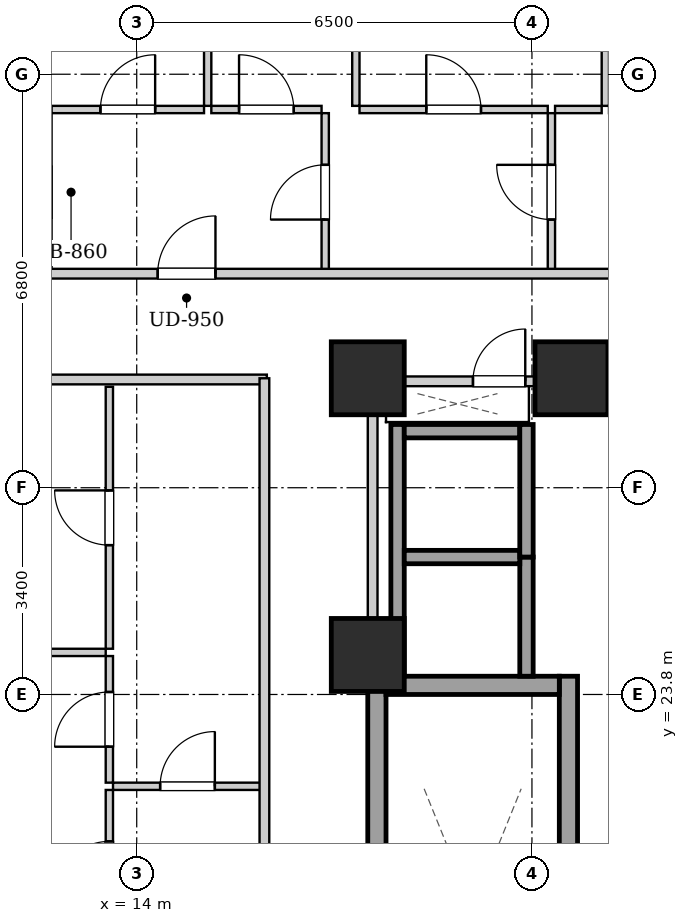
"""IFC4 building model, lengths in metres.
Left out: names, types, materials, properties, quantities, classifications, styles, units other than length and angle.
Written with IfcOpenShell. Run it as: python <this file> out.ifc"""

import sys

from ifc_helpers import new_model, si_unit, direction, frame, frame_2d, origin, origin_2d, place, context, subcontext, project, spatial, rectangle, extrude, element, fill, save


model = new_model("IFC4")
c1 = context("Model", 3, precision=1e-05, world=origin(), true_north=direction((0.0, 1.0)))
c2 = subcontext(c1, "Body", "Model", "MODEL_VIEW")
j1 = project(units=[si_unit("LENGTHUNIT", "METRE"), si_unit("PLANEANGLEUNIT", "RADIAN")], contexts=[c1])
p1 = place(None, origin())
s1 = spatial("IfcSite", under=j1, at=p1, CompositionType="ELEMENT")
p2 = place(p1, origin())
s2 = spatial("IfcBuilding", under=s1, at=p2, CompositionType="ELEMENT")
p3 = place(p2, frame((0.0, 0.0, 29.0)))
s3 = spatial("IfcBuildingStorey", under=s2, at=p3, CompositionType="ELEMENT", Elevation=29.0)
for number, where, z_axis, x_axis in (
    (1, (17.8, 29.0, 0.0), (0.0, 0.0, 1.0), (1.0, 0.0, 0.0)),
    (2, (21.15, 29.0, 0.0), (0.0, 0.0, 1.0), (1.0, 0.0, 0.0)),
    (3, (17.8, 24.45, 0.0), (0.0, 0.0, 1.0), (1.0, 0.0, 0.0)),
):
    element("IfcColumn", number, at=place(p3, frame(where, z_axis=z_axis, x_axis=x_axis)), inside=s3, PredefinedType="COLUMN", context=c2, shape_type="SweptSolid", body=[
        extrude(rectangle(XDim=1.2, YDim=1.2, at=origin_2d()), origin(), (0.0, 0.0, 1.0), 3.2),
    ])
for number, where, z_axis, x_axis in (
    (4, (17.95, 15.1, 0.0), (0.0, 0.0, 1.0), (0.0, 1.0, 0.0)),
    (5, (21.1, 15.1, 0.0), (0.0, 0.0, 1.0), (0.0, 1.0, 0.0)),
):
    element("IfcWall", number, at=place(p3, frame(where, z_axis=z_axis, x_axis=x_axis)), inside=s3, PredefinedType="SHEAR", context=c2, shape_type="SweptSolid", body=[
        extrude(rectangle(XDim=9.0, YDim=0.3, at=frame_2d((4.5, 0.0))), origin(), (0.0, 0.0, 1.0), 2.94),
    ])
p4 = place(p3, frame((18.1, 23.95, 0.0), z_axis=(0.0, 0.0, 1.0), x_axis=(1.0, 0.0, 0.0)))
e6 = element("IfcWall", 6, at=p4, inside=s3, PredefinedType="SHEAR", context=c2, shape_type="SweptSolid", body=[
    extrude(rectangle(XDim=2.85, YDim=0.3, at=frame_2d((1.425, 0.0))), origin(), (0.0, 0.0, 1.0), 2.94),
])
p5 = place(p3, frame((18.29, 24.1, 0.0), z_axis=(0.0, 0.0, 1.0), x_axis=(0.0, 1.0, 0.0)))
e7 = element("IfcWall", 7, at=p5, inside=s3, PredefinedType="SHEAR", context=c2, shape_type="SweptSolid", body=[
    extrude(rectangle(XDim=4.14, YDim=0.22, at=frame_2d((2.07, 0.0))), origin(), (0.0, 0.0, 1.0), 2.94),
])
p6 = place(p3, frame((20.41, 24.1, 0.0), z_axis=(0.0, 0.0, 1.0), x_axis=(0.0, 1.0, 0.0)))
e8 = element("IfcWall", 8, at=p6, inside=s3, PredefinedType="SHEAR", context=c2, shape_type="SweptSolid", body=[
    extrude(rectangle(XDim=1.96, YDim=0.22, at=frame_2d((0.98, 0.0))), origin(), (0.0, 0.0, 1.0), 2.94),
])
for number, where, z_axis, x_axis in (
    (9, (18.4, 26.06, 0.0), (0.0, 0.0, 1.0), (1.0, 0.0, 0.0)),
    (10, (18.4, 28.13, 0.0), (0.0, 0.0, 1.0), (1.0, 0.0, 0.0)),
):
    element("IfcWall", number, at=place(p3, frame(where, z_axis=z_axis, x_axis=x_axis)), inside=s3, PredefinedType="SHEAR", context=c2, shape_type="SweptSolid", body=[
        extrude(rectangle(XDim=1.9, YDim=0.22, at=frame_2d((0.95, 0.0))), origin(), (0.0, 0.0, 1.0), 2.94),
    ])
p7 = place(p3, frame((20.41, 26.06, 0.0), z_axis=(0.0, 0.0, 1.0), x_axis=(0.0, 1.0, 0.0)))
e11 = element("IfcWall", 11, at=p7, inside=s3, PredefinedType="SHEAR", context=c2, shape_type="SweptSolid", body=[
    extrude(rectangle(XDim=2.18, YDim=0.22, at=frame_2d((1.09, 0.0))), origin(), (0.0, 0.0, 1.0), 2.94),
])
p8 = place(p3, frame((17.88, 24.12, 0.0), z_axis=(0.0, 0.0, 1.0), x_axis=(0.0, 1.0, 0.0)))
e12 = element("IfcWall", 12, at=p8, inside=s3, PredefinedType="PARTITIONING", context=c2, shape_type="SweptSolid", body=[
    extrude(rectangle(XDim=4.76, YDim=0.16, at=frame_2d((2.38, 0.0))), origin(), (0.0, 0.0, 1.0), 2.275),
])
p9 = place(p3, frame((17.96, 28.95, 0.0), z_axis=(0.0, 0.0, 1.0), x_axis=(1.0, 0.0, 0.0)))
e13 = element("IfcWall", 13, at=p9, inside=s3, PredefinedType="PARTITIONING", context=c2, shape_type="SweptSolid", body=[
    extrude(rectangle(XDim=4.29, YDim=0.16, at=frame_2d((2.145, 0.0))), origin(), (0.0, 0.0, 1.0), 2.155),
])
p10 = place(p9, frame((1.57, 0.0, 0.0)))
e14 = element("IfcOpeningElement", 14, at=p10, cuts=e13, PredefinedType="OPENING", context=c2, shape_type="SweptSolid", body=[
    extrude(rectangle(XDim=0.86, YDim=2.05, at=frame_2d((0.43, 1.025))), frame((0.0, 0.09, 0.0), z_axis=(0.0, -1.0, 0.0), x_axis=(1.0, 0.0, 0.0)), (0.0, 0.0, 1.0), 0.18),
])
p11 = place(p3, frame((7.78, 28.98, 0.0), z_axis=(0.0, 0.0, 1.0), x_axis=(1.0, 0.0, 0.0)))
e15 = element("IfcWall", 15, at=p11, inside=s3, PredefinedType="PARTITIONING", context=c2, shape_type="SweptSolid", body=[
    extrude(rectangle(XDim=8.36, YDim=0.16, at=frame_2d((4.18, 0.0))), origin(), (0.0, 0.0, 1.0), 2.155),
])
p12 = place(p3, frame((17.1, 30.76, 0.0), z_axis=(0.0, 0.0, 1.0), x_axis=(0.0, 1.0, 0.0)))
e16 = element("IfcWall", 16, at=p12, inside=s3, PredefinedType="PARTITIONING", context=c2, shape_type="SweptSolid", body=[
    extrude(rectangle(XDim=2.6, YDim=0.12, at=frame_2d((1.3, 0.0))), origin(), (0.0, 0.0, 1.0), 2.94),
])
p13 = place(p12, frame((0.85, 0.0, 0.0)))
e17 = element("IfcOpeningElement", 17, at=p13, cuts=e16, PredefinedType="OPENING", context=c2, shape_type="SweptSolid", body=[
    extrude(rectangle(XDim=0.9, YDim=2.05, at=frame_2d((0.45, 1.025))), frame((0.0, 0.07, 0.0), z_axis=(0.0, -1.0, 0.0), x_axis=(1.0, 0.0, 0.0)), (0.0, 0.0, 1.0), 0.14),
])
p14 = place(p3, frame((12.6, 33.42, 0.0), z_axis=(0.0, 0.0, 1.0), x_axis=(1.0, 0.0, 0.0)))
e18 = element("IfcWall", 18, at=p14, inside=s3, PredefinedType="PARTITIONING", context=c2, shape_type="SweptSolid", body=[
    extrude(rectangle(XDim=2.507, YDim=0.12, at=frame_2d((1.253, 0.0))), origin(), (0.0, 0.0, 1.0), 2.94),
])
p15 = place(p14, frame((0.803, 0.0, 0.0)))
e19 = element("IfcOpeningElement", 19, at=p15, cuts=e18, PredefinedType="OPENING", context=c2, shape_type="SweptSolid", body=[
    extrude(rectangle(XDim=0.9, YDim=2.05, at=frame_2d((0.45, 1.025))), frame((0.0, 0.07, 0.0), z_axis=(0.0, -1.0, 0.0), x_axis=(1.0, 0.0, 0.0)), (0.0, 0.0, 1.0), 0.14),
])
p16 = place(p3, frame((15.227, 33.42, 0.0), z_axis=(0.0, 0.0, 1.0), x_axis=(1.0, 0.0, 0.0)))
e20 = element("IfcWall", 20, at=p16, inside=s3, PredefinedType="PARTITIONING", context=c2, shape_type="SweptSolid", body=[
    extrude(rectangle(XDim=1.813, YDim=0.12, at=frame_2d((0.906, 0.0))), origin(), (0.0, 0.0, 1.0), 2.94),
])
p17 = place(p16, frame((0.456, 0.0, 0.0)))
e21 = element("IfcOpeningElement", 21, at=p17, cuts=e20, PredefinedType="OPENING", context=c2, shape_type="SweptSolid", body=[
    extrude(rectangle(XDim=0.9, YDim=2.05, at=frame_2d((0.45, 1.025))), frame((0.0, 0.07, 0.0), z_axis=(0.0, -1.0, 0.0), x_axis=(1.0, 0.0, 0.0)), (0.0, 0.0, 1.0), 0.14),
])
p18 = place(p3, frame((20.82, 30.76, 0.0), z_axis=(0.0, 0.0, 1.0), x_axis=(0.0, 1.0, 0.0)))
e22 = element("IfcWall", 22, at=p18, inside=s3, PredefinedType="PARTITIONING", context=c2, shape_type="SweptSolid", body=[
    extrude(rectangle(XDim=2.6, YDim=0.12, at=frame_2d((1.3, 0.0))), origin(), (0.0, 0.0, 1.0), 2.94),
])
p19 = place(p18, frame((0.85, 0.0, 0.0)))
e23 = element("IfcOpeningElement", 23, at=p19, cuts=e22, PredefinedType="OPENING", context=c2, shape_type="SweptSolid", body=[
    extrude(rectangle(XDim=0.9, YDim=2.05, at=frame_2d((0.45, 1.025))), frame((0.0, 0.07, 0.0), z_axis=(0.0, -1.0, 0.0), x_axis=(1.0, 0.0, 0.0)), (0.0, 0.0, 1.0), 0.14),
])
p20 = place(p3, frame((17.664, 33.42, 0.0), z_axis=(0.0, 0.0, 1.0), x_axis=(1.0, 0.0, 0.0)))
e24 = element("IfcWall", 24, at=p20, inside=s3, PredefinedType="PARTITIONING", context=c2, shape_type="SweptSolid", body=[
    extrude(rectangle(XDim=3.096, YDim=0.12, at=frame_2d((1.548, 0.0))), origin(), (0.0, 0.0, 1.0), 2.94),
])
p21 = place(p20, frame((1.098, 0.0, 0.0)))
e25 = element("IfcOpeningElement", 25, at=p21, cuts=e24, PredefinedType="OPENING", context=c2, shape_type="SweptSolid", body=[
    extrude(rectangle(XDim=0.9, YDim=2.05, at=frame_2d((0.45, 1.025))), frame((0.0, 0.07, 0.0), z_axis=(0.0, -1.0, 0.0), x_axis=(1.0, 0.0, 0.0)), (0.0, 0.0, 1.0), 0.14),
])
p22 = place(p3, frame((20.88, 33.42, 0.0), z_axis=(0.0, 0.0, 1.0), x_axis=(1.0, 0.0, 0.0)))
e26 = element("IfcWall", 26, at=p22, inside=s3, PredefinedType="PARTITIONING", context=c2, shape_type="SweptSolid", body=[
    extrude(rectangle(XDim=0.767, YDim=0.12, at=frame_2d((0.384, 0.0))), origin(), (0.0, 0.0, 1.0), 2.94),
])
p23 = place(p3, frame((15.167, 33.48, 0.0), z_axis=(0.0, 0.0, 1.0), x_axis=(0.0, 1.0, 0.0)))
e27 = element("IfcWall", 27, at=p23, inside=s3, PredefinedType="PARTITIONING", context=c2, shape_type="SweptSolid", body=[
    extrude(rectangle(XDim=13.84, YDim=0.12, at=frame_2d((6.92, 0.0))), origin(), (0.0, 0.0, 1.0), 2.94),
])
p24 = place(p23, frame((6.455, 0.0, 0.0)))
e28 = element("IfcOpeningElement", 28, at=p24, cuts=e27, PredefinedType="OPENING", context=c2, shape_type="SweptSolid", body=[
    extrude(rectangle(XDim=0.9, YDim=2.05, at=frame_2d((0.45, 1.025))), frame((0.0, 0.07, 0.0), z_axis=(0.0, -1.0, 0.0), x_axis=(1.0, 0.0, 0.0)), (0.0, 0.0, 1.0), 0.14),
])
p25 = place(p3, frame((17.604, 33.48, 0.0), z_axis=(0.0, 0.0, 1.0), x_axis=(0.0, 1.0, 0.0)))
e29 = element("IfcWall", 29, at=p25, inside=s3, PredefinedType="PARTITIONING", context=c2, shape_type="SweptSolid", body=[
    extrude(rectangle(XDim=13.84, YDim=0.12, at=frame_2d((6.92, 0.0))), origin(), (0.0, 0.0, 1.0), 2.94),
])
p26 = place(p25, frame((6.455, 0.0, 0.0)))
e30 = element("IfcOpeningElement", 30, at=p26, cuts=e29, PredefinedType="OPENING", context=c2, shape_type="SweptSolid", body=[
    extrude(rectangle(XDim=0.9, YDim=2.05, at=frame_2d((0.45, 1.025))), frame((0.0, 0.07, 0.0), z_axis=(0.0, -1.0, 0.0), x_axis=(1.0, 0.0, 0.0)), (0.0, 0.0, 1.0), 0.14),
])
p27 = place(p3, frame((21.707, 33.48, 0.0), z_axis=(0.0, 0.0, 1.0), x_axis=(0.0, 1.0, 0.0)))
e31 = element("IfcWall", 31, at=p27, inside=s3, PredefinedType="PARTITIONING", context=c2, shape_type="SweptSolid", body=[
    extrude(rectangle(XDim=13.84, YDim=0.12, at=frame_2d((6.92, 0.0))), origin(), (0.0, 0.0, 1.0), 2.94),
])
p28 = place(p27, frame((6.455, 0.0, 0.0)))
e32 = element("IfcOpeningElement", 32, at=p28, cuts=e31, PredefinedType="OPENING", context=c2, shape_type="SweptSolid", body=[
    extrude(rectangle(XDim=0.9, YDim=2.05, at=frame_2d((0.45, 1.025))), frame((0.0, 0.07, 0.0), z_axis=(0.0, -1.0, 0.0), x_axis=(1.0, 0.0, 0.0)), (0.0, 0.0, 1.0), 0.14),
])
p29 = place(p3, frame((13.61, 22.29, 0.0), z_axis=(0.0, 0.0, 1.0), x_axis=(1.0, 0.0, 0.0)))
e33 = element("IfcWall", 33, at=p29, inside=s3, PredefinedType="PARTITIONING", context=c2, shape_type="SweptSolid", body=[
    extrude(rectangle(XDim=2.45, YDim=0.12, at=frame_2d((1.225, 0.0))), origin(), (0.0, 0.0, 1.0), 2.94),
])
p30 = place(p29, frame((0.775, 0.0, 0.0)))
e34 = element("IfcOpeningElement", 34, at=p30, cuts=e33, PredefinedType="OPENING", context=c2, shape_type="SweptSolid", body=[
    extrude(rectangle(XDim=0.9, YDim=2.05, at=frame_2d((0.45, 1.025))), frame((0.0, 0.07, 0.0), z_axis=(0.0, -1.0, 0.0), x_axis=(1.0, 0.0, 0.0)), (0.0, 0.0, 1.0), 0.14),
])
p31 = place(p3, frame((13.55, 22.35, 0.0), z_axis=(0.0, 0.0, 1.0), x_axis=(0.0, 1.0, 0.0)))
e35 = element("IfcWall", 35, at=p31, inside=s3, PredefinedType="PARTITIONING", context=c2, shape_type="SweptSolid", body=[
    extrude(rectangle(XDim=2.082, YDim=0.12, at=frame_2d((1.041, 0.0))), origin(), (0.0, 0.0, 1.0), 2.94),
])
p32 = place(p31, frame((0.591, 0.0, 0.0)))
e36 = element("IfcOpeningElement", 36, at=p32, cuts=e35, PredefinedType="OPENING", context=c2, shape_type="SweptSolid", body=[
    extrude(rectangle(XDim=0.9, YDim=2.05, at=frame_2d((0.45, 1.025))), frame((0.0, 0.07, 0.0), z_axis=(0.0, -1.0, 0.0), x_axis=(1.0, 0.0, 0.0)), (0.0, 0.0, 1.0), 0.14),
])
p33 = place(p3, frame((13.55, 24.552, 0.0), z_axis=(0.0, 0.0, 1.0), x_axis=(0.0, 1.0, 0.0)))
e37 = element("IfcWall", 37, at=p33, inside=s3, PredefinedType="PARTITIONING", context=c2, shape_type="SweptSolid", body=[
    extrude(rectangle(XDim=4.308, YDim=0.12, at=frame_2d((2.154, 0.0))), origin(), (0.0, 0.0, 1.0), 2.94),
])
p34 = place(p33, frame((1.704, 0.0, 0.0)))
e38 = element("IfcOpeningElement", 38, at=p34, cuts=e37, PredefinedType="OPENING", context=c2, shape_type="SweptSolid", body=[
    extrude(rectangle(XDim=0.9, YDim=2.05, at=frame_2d((0.45, 1.025))), frame((0.0, 0.07, 0.0), z_axis=(0.0, -1.0, 0.0), x_axis=(1.0, 0.0, 0.0)), (0.0, 0.0, 1.0), 0.14),
])
p35 = place(p3, frame((13.55, 19.638, 0.0), z_axis=(0.0, 0.0, 1.0), x_axis=(0.0, 1.0, 0.0)))
e39 = element("IfcWall", 39, at=p35, inside=s3, PredefinedType="PARTITIONING", context=c2, shape_type="SweptSolid", body=[
    extrude(rectangle(XDim=2.592, YDim=0.12, at=frame_2d((1.296, 0.0))), origin(), (0.0, 0.0, 1.0), 2.94),
])
p36 = place(p35, frame((0.846, 0.0, 0.0)))
e40 = element("IfcOpeningElement", 40, at=p36, cuts=e39, PredefinedType="OPENING", context=c2, shape_type="SweptSolid", body=[
    extrude(rectangle(XDim=0.9, YDim=2.05, at=frame_2d((0.45, 1.025))), frame((0.0, 0.07, 0.0), z_axis=(0.0, -1.0, 0.0), x_axis=(1.0, 0.0, 0.0)), (0.0, 0.0, 1.0), 0.14),
])
p37 = place(p3, frame((9.93, 24.492, 0.0), z_axis=(0.0, 0.0, 1.0), x_axis=(1.0, 0.0, 0.0)))
e41 = element("IfcWall", 41, at=p37, inside=s3, PredefinedType="PARTITIONING", context=c2, shape_type="SweptSolid", body=[
    extrude(rectangle(XDim=3.56, YDim=0.12, at=frame_2d((1.78, 0.0))), origin(), (0.0, 0.0, 1.0), 2.508),
])
p38 = place(p37, frame((1.33, 0.0, 0.0)))
e42 = element("IfcOpeningElement", 42, at=p38, cuts=e41, PredefinedType="OPENING", context=c2, shape_type="SweptSolid", body=[
    extrude(rectangle(XDim=0.9, YDim=2.05, at=frame_2d((0.45, 1.025))), frame((0.0, 0.07, 0.0), z_axis=(0.0, -1.0, 0.0), x_axis=(1.0, 0.0, 0.0)), (0.0, 0.0, 1.0), 0.14),
])
p39 = place(p3, frame((10.05, 30.72, 0.0), z_axis=(0.0, 0.0, 1.0), x_axis=(1.0, 0.0, 0.0)))
e43 = element("IfcWall", 43, at=p39, inside=s3, PredefinedType="PARTITIONING", context=c2, shape_type="SweptSolid", body=[
    extrude(rectangle(XDim=33.9, YDim=0.16, at=frame_2d((16.95, 0.0))), origin(), (0.0, 0.0, 1.0), 2.94),
])
p40 = place(p39, frame((4.295, 0.0, 0.0)))
e44 = element("IfcOpeningElement", 44, at=p40, cuts=e43, PredefinedType="OPENING", context=c2, shape_type="SweptSolid", body=[
    extrude(rectangle(XDim=0.95, YDim=2.1, at=frame_2d((0.475, 1.05))), frame((0.0, 0.09, 0.0), z_axis=(0.0, -1.0, 0.0), x_axis=(1.0, 0.0, 0.0)), (0.0, 0.0, 1.0), 0.18),
])
p41 = place(p39, frame((27.235, 0.0, 0.0)))
e45 = element("IfcOpeningElement", 45, at=p41, cuts=e43, PredefinedType="OPENING", context=c2, shape_type="SweptSolid", body=[
    extrude(rectangle(XDim=0.95, YDim=2.1, at=frame_2d((0.475, 1.05))), frame((0.0, 0.09, 0.0), z_axis=(0.0, -1.0, 0.0), x_axis=(1.0, 0.0, 0.0)), (0.0, 0.0, 1.0), 0.18),
])
p42 = place(p3, frame((16.1, 15.07, 0.0), z_axis=(0.0, 0.0, 1.0), x_axis=(0.0, 1.0, 0.0)))
e46 = element("IfcWall", 46, at=p42, inside=s3, PredefinedType="PARTITIONING", context=c2, shape_type="SweptSolid", body=[
    extrude(rectangle(XDim=13.93, YDim=0.16, at=frame_2d((6.965, 0.0))), origin(), (0.0, 0.0, 1.0), 2.94),
])
p43 = place(p42, frame((4.385, 0.0, 0.0)))
e47 = element("IfcOpeningElement", 47, at=p43, cuts=e46, PredefinedType="OPENING", context=c2, shape_type="SweptSolid", body=[
    extrude(rectangle(XDim=0.95, YDim=2.1, at=frame_2d((0.475, 1.05))), frame((0.0, 0.09, 0.0), z_axis=(0.0, -1.0, 0.0), x_axis=(1.0, 0.0, 0.0)), (0.0, 0.0, 1.0), 0.18),
])
p44 = place(p10, origin())
e48 = element("IfcDoor", 48, at=p44, inside=s3, OperationType="SINGLE_SWING_RIGHT", PredefinedType="DOOR", context=c2, shape_type="SweptSolid", body=[
    extrude(rectangle(XDim=0.86, YDim=2.05, at=frame_2d((0.43, 1.025))), frame((0.0, 0.025, 0.0), z_axis=(0.0, -1.0, 0.0), x_axis=(1.0, 0.0, 0.0)), (0.0, 0.0, 1.0), 0.05),
])
fill(e14, e48)
p45 = place(p13, origin())
e49 = element("IfcDoor", 49, at=p45, inside=s3, OperationType="SINGLE_SWING_LEFT", PredefinedType="DOOR", context=c2, shape_type="SweptSolid", body=[
    extrude(rectangle(XDim=0.9, YDim=2.05, at=frame_2d((0.45, 1.025))), frame((0.0, 0.025, 0.0), z_axis=(0.0, -1.0, 0.0), x_axis=(1.0, 0.0, 0.0)), (0.0, 0.0, 1.0), 0.05),
])
fill(e17, e49)
p46 = place(p15, origin())
e50 = element("IfcDoor", 50, at=p46, inside=s3, OperationType="SINGLE_SWING_RIGHT", PredefinedType="DOOR", context=c2, shape_type="SweptSolid", body=[
    extrude(rectangle(XDim=0.9, YDim=2.05, at=frame_2d((0.45, 1.025))), frame((0.0, 0.025, 0.0), z_axis=(0.0, -1.0, 0.0), x_axis=(1.0, 0.0, 0.0)), (0.0, 0.0, 1.0), 0.05),
])
fill(e19, e50)
p47 = place(p17, origin())
e51 = element("IfcDoor", 51, at=p47, inside=s3, OperationType="SINGLE_SWING_LEFT", PredefinedType="DOOR", context=c2, shape_type="SweptSolid", body=[
    extrude(rectangle(XDim=0.9, YDim=2.05, at=frame_2d((0.45, 1.025))), frame((0.0, 0.025, 0.0), z_axis=(0.0, -1.0, 0.0), x_axis=(1.0, 0.0, 0.0)), (0.0, 0.0, 1.0), 0.05),
])
fill(e21, e51)
p48 = place(p19, origin())
e52 = element("IfcDoor", 52, at=p48, inside=s3, OperationType="SINGLE_SWING_RIGHT", PredefinedType="DOOR", context=c2, shape_type="SweptSolid", body=[
    extrude(rectangle(XDim=0.9, YDim=2.05, at=frame_2d((0.45, 1.025))), frame((0.0, 0.025, 0.0), z_axis=(0.0, -1.0, 0.0), x_axis=(1.0, 0.0, 0.0)), (0.0, 0.0, 1.0), 0.05),
])
fill(e23, e52)
p49 = place(p21, origin())
e53 = element("IfcDoor", 53, at=p49, inside=s3, OperationType="SINGLE_SWING_LEFT", PredefinedType="DOOR", context=c2, shape_type="SweptSolid", body=[
    extrude(rectangle(XDim=0.9, YDim=2.05, at=frame_2d((0.45, 1.025))), frame((0.0, 0.025, 0.0), z_axis=(0.0, -1.0, 0.0), x_axis=(1.0, 0.0, 0.0)), (0.0, 0.0, 1.0), 0.05),
])
fill(e25, e53)
p50 = place(p30, origin())
e54 = element("IfcDoor", 54, at=p50, inside=s3, OperationType="SINGLE_SWING_RIGHT", PredefinedType="DOOR", context=c2, shape_type="SweptSolid", body=[
    extrude(rectangle(XDim=0.9, YDim=2.05, at=frame_2d((0.45, 1.025))), frame((0.0, 0.025, 0.0), z_axis=(0.0, -1.0, 0.0), x_axis=(1.0, 0.0, 0.0)), (0.0, 0.0, 1.0), 0.05),
])
fill(e34, e54)
p51 = place(p32, origin())
e55 = element("IfcDoor", 55, at=p51, inside=s3, OperationType="SINGLE_SWING_LEFT", PredefinedType="DOOR", context=c2, shape_type="SweptSolid", body=[
    extrude(rectangle(XDim=0.9, YDim=2.05, at=frame_2d((0.45, 1.025))), frame((0.0, 0.025, 0.0), z_axis=(0.0, -1.0, 0.0), x_axis=(1.0, 0.0, 0.0)), (0.0, 0.0, 1.0), 0.05),
])
fill(e36, e55)
p52 = place(p34, origin())
e56 = element("IfcDoor", 56, at=p52, inside=s3, OperationType="SINGLE_SWING_RIGHT", PredefinedType="DOOR", context=c2, shape_type="SweptSolid", body=[
    extrude(rectangle(XDim=0.9, YDim=2.05, at=frame_2d((0.45, 1.025))), frame((0.0, 0.025, 0.0), z_axis=(0.0, -1.0, 0.0), x_axis=(1.0, 0.0, 0.0)), (0.0, 0.0, 1.0), 0.05),
])
fill(e38, e56)
p53 = place(p36, origin())
e57 = element("IfcDoor", 57, at=p53, inside=s3, OperationType="SINGLE_SWING_LEFT", PredefinedType="DOOR", context=c2, shape_type="SweptSolid", body=[
    extrude(rectangle(XDim=0.9, YDim=2.05, at=frame_2d((0.45, 1.025))), frame((0.0, 0.025, 0.0), z_axis=(0.0, -1.0, 0.0), x_axis=(1.0, 0.0, 0.0)), (0.0, 0.0, 1.0), 0.05),
])
fill(e40, e57)
p54 = place(p40, origin())
e58 = element("IfcDoor", 58, at=p54, inside=s3, OperationType="SINGLE_SWING_RIGHT", PredefinedType="DOOR", context=c2, shape_type="SweptSolid", body=[
    extrude(rectangle(XDim=0.95, YDim=2.1, at=frame_2d((0.475, 1.05))), frame((0.0, 0.025, 0.0), z_axis=(0.0, -1.0, 0.0), x_axis=(1.0, 0.0, 0.0)), (0.0, 0.0, 1.0), 0.05),
])
fill(e44, e58)
save(model, sys.argv[1])
